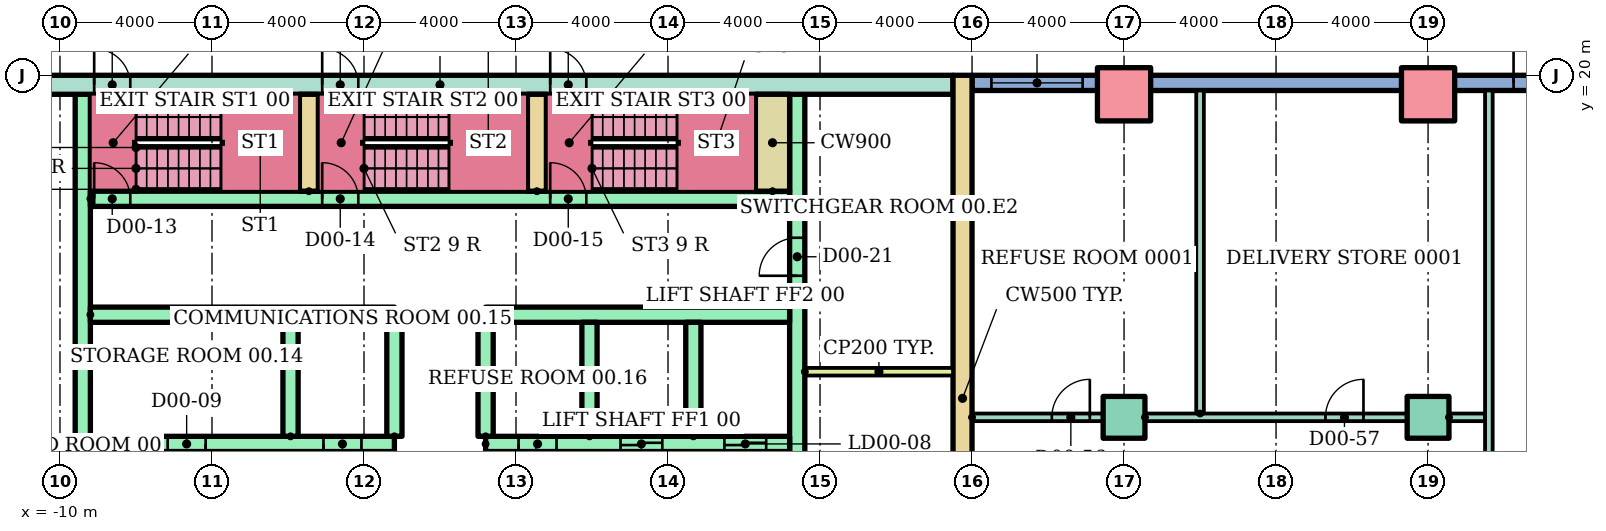
"""IFC4 building model, lengths in metres.
Left out: names, types, materials, properties, quantities, classifications, styles, units other than length and angle.
Written with IfcOpenShell. Run it as: python <this file> out.ifc"""

import sys

from ifc_helpers import new_model, si_unit, direction, frame, frame_2d, origin, origin_2d, place, context, subcontext, project, spatial, rectangle, hollow_rectangle, extrude, element, fill, save


model = new_model("IFC4")
c1 = context("Model", 3, precision=1e-05, world=origin(), true_north=direction((0.0, 1.0)))
c2 = subcontext(c1, "Body", "Model", "MODEL_VIEW")
j1 = project(units=[si_unit("LENGTHUNIT", "METRE"), si_unit("PLANEANGLEUNIT", "RADIAN")], contexts=[c1])
p1 = place(None, origin())
s1 = spatial("IfcSite", under=j1, at=p1, CompositionType="ELEMENT")
p2 = place(p1, origin())
s2 = spatial("IfcBuilding", under=s1, at=p2, CompositionType="ELEMENT")
p3 = place(p2, origin())
s3 = spatial("IfcBuildingStorey", under=s2, at=p3, CompositionType="ELEMENT", Elevation=0.0)
for number, where in (
    (1, (18.0, 11.0, 0.0)),
    (2, (26.0, 11.0, 0.0)),
):
    element("IfcColumn", number, at=place(p3, frame(where)), inside=s3, PredefinedType="COLUMN", context=c2, shape_type="SweptSolid", body=[
        extrude(rectangle(XDim=1.1, YDim=1.1, at=origin_2d()), origin(), (0.0, 0.0, 1.0), 6.0),
    ])
for number, where in (
    (3, (18.0, 19.5, 0.0)),
    (4, (26.0, 19.5, 0.0)),
):
    element("IfcColumn", number, at=place(p3, frame(where)), inside=s3, PredefinedType="COLUMN", context=c2, shape_type="SweptSolid", body=[
        extrude(hollow_rectangle(XDim=1.4, YDim=1.4, WallThickness=0.08, at=origin_2d()), origin(), (0.0, 0.0, 1.0), 6.0),
    ])
p4 = place(p3, frame((39.6, 19.8, 0.0), z_axis=(0.0, 0.0, 1.0), x_axis=(-1.0, 0.0, 0.0)))
e5 = element("IfcWall", 5, at=p4, inside=s3, PredefinedType="STANDARD", context=c2, shape_type="SweptSolid", body=[
    extrude(rectangle(XDim=25.6, YDim=0.4, at=frame_2d((12.8, 0.0))), origin(), (0.0, 0.0, 1.0), 5.7),
])
p5 = place(p4, frame((2.7, 0.0, 0.0)))
e6 = element("IfcOpeningElement", 6, at=p5, cuts=e5, PredefinedType="OPENING", context=c2, shape_type="SweptSolid", body=[
    extrude(rectangle(XDim=1.8, YDim=2.4, at=frame_2d((0.9, 1.2))), frame((0.0, 0.21, 0.0), z_axis=(0.0, -1.0, 0.0), x_axis=(1.0, 0.0, 0.0)), (0.0, 0.0, 1.0), 0.42),
])
p6 = place(p4, frame((22.69, 0.0, 0.9)))
e7 = element("IfcOpeningElement", 7, at=p6, cuts=e5, PredefinedType="OPENING", context=c2, shape_type="SweptSolid", body=[
    extrude(rectangle(XDim=2.4, YDim=2.4, at=frame_2d((1.2, 1.2))), frame((0.0, 0.21, 0.0), z_axis=(0.0, -1.0, 0.0), x_axis=(1.0, 0.0, 0.0)), (0.0, 0.0, 1.0), 0.42),
])
p7 = place(p4, frame((7.85, 0.0, 0.0)))
e8 = element("IfcOpeningElement", 8, at=p7, cuts=e5, PredefinedType="OPENING", context=c2, shape_type="SweptSolid", body=[
    extrude(rectangle(XDim=3.5, YDim=4.5, at=frame_2d((1.75, 2.25))), frame((0.0, 0.21, 0.0), z_axis=(0.0, -1.0, 0.0), x_axis=(1.0, 0.0, 0.0)), (0.0, 0.0, 1.0), 0.42),
])
p8 = place(p3, frame((13.75, 3.0, 0.0), z_axis=(0.0, 0.0, 1.0), x_axis=(0.0, 1.0, 0.0)))
e9 = element("IfcWall", 9, at=p8, inside=s3, PredefinedType="SHEAR", context=c2, shape_type="SweptSolid", body=[
    extrude(rectangle(XDim=17.0, YDim=0.5, at=frame_2d((8.5, 0.0))), origin(), (0.0, 0.0, 1.0), 5.7),
])
p9 = place(p3, frame((-13.5, 19.75, 0.0)))
e10 = element("IfcWall", 10, at=p9, inside=s3, PredefinedType="SHEAR", context=c2, shape_type="SweptSolid", body=[
    extrude(rectangle(XDim=27.0, YDim=0.5, at=frame_2d((13.5, 0.0))), origin(), (0.0, 0.0, 1.0), 5.7),
])
p10 = place(p9, frame((4.4, 0.0, 0.0)))
e11 = element("IfcOpeningElement", 11, at=p10, cuts=e10, PredefinedType="OPENING", context=c2, shape_type="SweptSolid", body=[
    extrude(rectangle(XDim=0.95, YDim=2.1, at=frame_2d((0.475, 1.05))), frame((0.0, 0.26, 0.0), z_axis=(0.0, -1.0, 0.0), x_axis=(1.0, 0.0, 0.0)), (0.0, 0.0, 1.0), 0.52),
])
p11 = place(p9, frame((10.4, 0.0, 0.0)))
e12 = element("IfcOpeningElement", 12, at=p11, cuts=e10, PredefinedType="OPENING", context=c2, shape_type="SweptSolid", body=[
    extrude(rectangle(XDim=0.95, YDim=2.1, at=frame_2d((0.475, 1.05))), frame((0.0, 0.26, 0.0), z_axis=(0.0, -1.0, 0.0), x_axis=(1.0, 0.0, 0.0)), (0.0, 0.0, 1.0), 0.52),
])
p12 = place(p9, frame((16.4, 0.0, 0.0)))
e13 = element("IfcOpeningElement", 13, at=p12, cuts=e10, PredefinedType="OPENING", context=c2, shape_type="SweptSolid", body=[
    extrude(rectangle(XDim=0.95, YDim=2.1, at=frame_2d((0.475, 1.05))), frame((0.0, 0.26, 0.0), z_axis=(0.0, -1.0, 0.0), x_axis=(1.0, 0.0, 0.0)), (0.0, 0.0, 1.0), 0.52),
])
p13 = place(p3, frame((-9.4, 6.8, 0.0), z_axis=(0.0, 0.0, 1.0), x_axis=(0.0, 1.0, 0.0)))
e14 = element("IfcWall", 14, at=p13, inside=s3, PredefinedType="SHEAR", context=c2, shape_type="SweptSolid", body=[
    extrude(rectangle(XDim=12.7, YDim=0.4, at=frame_2d((6.35, 0.0))), origin(), (0.0, 0.0, 1.0), 5.7),
])
p14 = place(p13, frame((1.1, 0.0, 0.0)))
e15 = element("IfcOpeningElement", 15, at=p14, cuts=e14, PredefinedType="OPENING", context=c2, shape_type="SweptSolid", body=[
    extrude(rectangle(XDim=1.1, YDim=2.1, at=frame_2d((0.55, 1.05))), frame((0.0, 0.21, 0.0), z_axis=(0.0, -1.0, 0.0), x_axis=(1.0, 0.0, 0.0)), (0.0, 0.0, 1.0), 0.42),
])
p15 = place(p3, frame((9.4, 6.8, 0.0), z_axis=(0.0, 0.0, 1.0), x_axis=(0.0, 1.0, 0.0)))
e16 = element("IfcWall", 16, at=p15, inside=s3, PredefinedType="SHEAR", context=c2, shape_type="SweptSolid", body=[
    extrude(rectangle(XDim=12.7, YDim=0.4, at=frame_2d((6.35, 0.0))), origin(), (0.0, 0.0, 1.0), 5.7),
])
p16 = place(p15, frame((1.15, 0.0, 0.0)))
e17 = element("IfcOpeningElement", 17, at=p16, cuts=e16, PredefinedType="OPENING", context=c2, shape_type="SweptSolid", body=[
    extrude(rectangle(XDim=1.0, YDim=2.1, at=frame_2d((0.5, 1.05))), frame((0.0, 0.21, 0.0), z_axis=(0.0, -1.0, 0.0), x_axis=(1.0, 0.0, 0.0)), (0.0, 0.0, 1.0), 0.42),
])
p17 = place(p15, frame((7.925, 0.0, 0.0)))
e18 = element("IfcOpeningElement", 18, at=p17, cuts=e16, PredefinedType="OPENING", context=c2, shape_type="SweptSolid", body=[
    extrude(rectangle(XDim=1.0, YDim=2.1, at=frame_2d((0.5, 1.05))), frame((0.0, 0.21, 0.0), z_axis=(0.0, -1.0, 0.0), x_axis=(1.0, 0.0, 0.0)), (0.0, 0.0, 1.0), 0.42),
])
p18 = place(p3, frame((-9.2, 10.3, 0.0)))
e19 = element("IfcWall", 19, at=p18, inside=s3, PredefinedType="SHEAR", context=c2, shape_type="SweptSolid", body=[
    extrude(rectangle(XDim=8.0, YDim=0.4, at=frame_2d((4.0, 0.0))), origin(), (0.0, 0.0, 1.0), 5.7),
])
p19 = place(p18, frame((2.033, 0.0, 0.0)))
e20 = element("IfcOpeningElement", 20, at=p19, cuts=e19, PredefinedType="OPENING", context=c2, shape_type="SweptSolid", body=[
    extrude(rectangle(XDim=1.0, YDim=2.1, at=frame_2d((0.5, 1.05))), frame((0.0, 0.21, 0.0), z_axis=(0.0, -1.0, 0.0), x_axis=(1.0, 0.0, 0.0)), (0.0, 0.0, 1.0), 0.42),
])
p20 = place(p18, frame((6.133, 0.0, 0.0)))
e21 = element("IfcOpeningElement", 21, at=p20, cuts=e19, PredefinedType="OPENING", context=c2, shape_type="SweptSolid", body=[
    extrude(rectangle(XDim=1.0, YDim=2.1, at=frame_2d((0.5, 1.05))), frame((0.0, 0.21, 0.0), z_axis=(0.0, -1.0, 0.0), x_axis=(1.0, 0.0, 0.0)), (0.0, 0.0, 1.0), 0.42),
])
p21 = place(p3, frame((-9.2, 13.7, 0.0)))
e22 = element("IfcWall", 22, at=p21, inside=s3, PredefinedType="SHEAR", context=c2, shape_type="SweptSolid", body=[
    extrude(rectangle(XDim=8.0, YDim=0.4, at=frame_2d((4.0, 0.0))), origin(), (0.0, 0.0, 1.0), 5.7),
])
p22 = place(p3, frame((1.2, 10.3, 0.0)))
e23 = element("IfcWall", 23, at=p22, inside=s3, PredefinedType="SHEAR", context=c2, shape_type="SweptSolid", body=[
    extrude(rectangle(XDim=8.0, YDim=0.4, at=frame_2d((4.0, 0.0))), origin(), (0.0, 0.0, 1.0), 5.7),
])
p23 = place(p22, frame((3.55, 0.0, 0.0)))
e24 = element("IfcOpeningElement", 24, at=p23, cuts=e23, PredefinedType="OPENING", context=c2, shape_type="SweptSolid", body=[
    extrude(rectangle(XDim=1.1, YDim=2.1, at=frame_2d((0.55, 1.05))), frame((0.0, 0.21, 0.0), z_axis=(0.0, -1.0, 0.0), x_axis=(1.0, 0.0, 0.0)), (0.0, 0.0, 1.0), 0.42),
])
p24 = place(p22, frame((6.283, 0.0, 0.0)))
e25 = element("IfcOpeningElement", 25, at=p24, cuts=e23, PredefinedType="OPENING", context=c2, shape_type="SweptSolid", body=[
    extrude(rectangle(XDim=1.1, YDim=2.1, at=frame_2d((0.55, 1.05))), frame((0.0, 0.21, 0.0), z_axis=(0.0, -1.0, 0.0), x_axis=(1.0, 0.0, 0.0)), (0.0, 0.0, 1.0), 0.42),
])
p25 = place(p22, frame((0.867, 0.0, 0.0)))
e26 = element("IfcOpeningElement", 26, at=p25, cuts=e23, PredefinedType="OPENING", context=c2, shape_type="SweptSolid", body=[
    extrude(rectangle(XDim=1.0, YDim=2.1, at=frame_2d((0.5, 1.05))), frame((0.0, 0.21, 0.0), z_axis=(0.0, -1.0, 0.0), x_axis=(1.0, 0.0, 0.0)), (0.0, 0.0, 1.0), 0.42),
])
p26 = place(p3, frame((1.2, 13.7, 0.0)))
e27 = element("IfcWall", 27, at=p26, inside=s3, PredefinedType="SHEAR", context=c2, shape_type="SweptSolid", body=[
    extrude(rectangle(XDim=8.0, YDim=0.4, at=frame_2d((4.0, 0.0))), origin(), (0.0, 0.0, 1.0), 5.7),
])
for number, where, z_axis, x_axis in (
    (28, (-3.933, 10.5, 0.0), (0.0, 0.0, 1.0), (0.0, 1.0, 0.0)),
    (29, (-1.2, 10.5, 0.0), (0.0, 0.0, 1.0), (0.0, 1.0, 0.0)),
    (30, (1.2, 10.5, 0.0), (0.0, 0.0, 1.0), (0.0, 1.0, 0.0)),
    (31, (3.933, 10.5, 0.0), (0.0, 0.0, 1.0), (0.0, 1.0, 0.0)),
    (32, (6.667, 10.5, 0.0), (0.0, 0.0, 1.0), (0.0, 1.0, 0.0)),
):
    element("IfcWall", number, at=place(p3, frame(where, z_axis=z_axis, x_axis=x_axis)), inside=s3, PredefinedType="SHEAR", context=c2, shape_type="SweptSolid", body=[
        extrude(rectangle(XDim=3.0, YDim=0.4, at=frame_2d((1.5, 0.0))), origin(), (0.0, 0.0, 1.0), 5.7),
    ])
p27 = place(p3, frame((-9.2, 16.75, 0.0)))
e33 = element("IfcWall", 33, at=p27, inside=s3, PredefinedType="SHEAR", context=c2, shape_type="SweptSolid", body=[
    extrude(rectangle(XDim=18.4, YDim=0.4, at=frame_2d((9.2, 0.0))), origin(), (0.0, 0.0, 1.0), 5.7),
])
p28 = place(p27, frame((0.1, 0.0, 0.0)))
e34 = element("IfcOpeningElement", 34, at=p28, cuts=e33, PredefinedType="OPENING", context=c2, shape_type="SweptSolid", body=[
    extrude(rectangle(XDim=0.95, YDim=2.1, at=frame_2d((0.475, 1.05))), frame((0.0, 0.21, 0.0), z_axis=(0.0, -1.0, 0.0), x_axis=(1.0, 0.0, 0.0)), (0.0, 0.0, 1.0), 0.42),
])
p29 = place(p27, frame((6.1, 0.0, 0.0)))
e35 = element("IfcOpeningElement", 35, at=p29, cuts=e33, PredefinedType="OPENING", context=c2, shape_type="SweptSolid", body=[
    extrude(rectangle(XDim=0.95, YDim=2.1, at=frame_2d((0.475, 1.05))), frame((0.0, 0.21, 0.0), z_axis=(0.0, -1.0, 0.0), x_axis=(1.0, 0.0, 0.0)), (0.0, 0.0, 1.0), 0.42),
])
p30 = place(p27, frame((12.1, 0.0, 0.0)))
e36 = element("IfcOpeningElement", 36, at=p30, cuts=e33, PredefinedType="OPENING", context=c2, shape_type="SweptSolid", body=[
    extrude(rectangle(XDim=0.95, YDim=2.1, at=frame_2d((0.475, 1.05))), frame((0.0, 0.21, 0.0), z_axis=(0.0, -1.0, 0.0), x_axis=(1.0, 0.0, 0.0)), (0.0, 0.0, 1.0), 0.42),
])
for number, where, z_axis, x_axis in (
    (37, (-3.45, 16.95, 0.0), (0.0, 0.0, 1.0), (0.0, 1.0, 0.0)),
    (38, (2.55, 16.95, 0.0), (0.0, 0.0, 1.0), (0.0, 1.0, 0.0)),
):
    element("IfcWall", number, at=place(p3, frame(where, z_axis=z_axis, x_axis=x_axis)), inside=s3, PredefinedType="SHEAR", context=c2, shape_type="SweptSolid", body=[
        extrude(rectangle(XDim=2.55, YDim=0.5, at=frame_2d((1.275, 0.0))), origin(), (0.0, 0.0, 1.0), 5.7),
    ])
p31 = place(p3, frame((8.75, 16.95, 0.0), z_axis=(0.0, 0.0, 1.0), x_axis=(0.0, 1.0, 0.0)))
e39 = element("IfcWall", 39, at=p31, inside=s3, PredefinedType="SHEAR", context=c2, shape_type="SweptSolid", body=[
    extrude(rectangle(XDim=2.55, YDim=0.9, at=frame_2d((1.275, 0.0))), origin(), (0.0, 0.0, 1.0), 5.7),
])
p32 = place(p3, frame((9.6, 12.2, 0.0)))
e40 = element("IfcWall", 40, at=p32, inside=s3, PredefinedType="PARTITIONING", context=c2, shape_type="SweptSolid", body=[
    extrude(rectangle(XDim=3.9, YDim=0.2, at=frame_2d((1.95, 0.0))), origin(), (0.0, 0.0, 1.0), 5.7),
])
p33 = place(p3, frame((14.0, 11.0, 0.0)))
e41 = element("IfcWall", 41, at=p33, inside=s3, PredefinedType="PARTITIONING", context=c2, shape_type="SweptSolid", body=[
    extrude(rectangle(XDim=3.45, YDim=0.2, at=frame_2d((1.725, 0.0))), origin(), (0.0, 0.0, 1.0), 5.7),
])
p34 = place(p33, frame((2.1, 0.0, 0.0)))
e42 = element("IfcOpeningElement", 42, at=p34, cuts=e41, PredefinedType="OPENING", context=c2, shape_type="SweptSolid", body=[
    extrude(rectangle(XDim=1.0, YDim=2.1, at=frame_2d((0.5, 1.05))), frame((0.0, 0.11, 0.0), z_axis=(0.0, -1.0, 0.0), x_axis=(1.0, 0.0, 0.0)), (0.0, 0.0, 1.0), 0.22),
])
p35 = place(p3, frame((18.55, 11.0, 0.0)))
e43 = element("IfcWall", 43, at=p35, inside=s3, PredefinedType="PARTITIONING", context=c2, shape_type="SweptSolid", body=[
    extrude(rectangle(XDim=6.9, YDim=0.2, at=frame_2d((3.45, 0.0))), origin(), (0.0, 0.0, 1.0), 5.7),
])
p36 = place(p35, frame((4.75, 0.0, 0.0)))
e44 = element("IfcOpeningElement", 44, at=p36, cuts=e43, PredefinedType="OPENING", context=c2, shape_type="SweptSolid", body=[
    extrude(rectangle(XDim=1.0, YDim=2.1, at=frame_2d((0.5, 1.05))), frame((0.0, 0.11, 0.0), z_axis=(0.0, -1.0, 0.0), x_axis=(1.0, 0.0, 0.0)), (0.0, 0.0, 1.0), 0.22),
])
p37 = place(p3, frame((26.55, 11.0, 0.0)))
e45 = element("IfcWall", 45, at=p37, inside=s3, PredefinedType="PARTITIONING", context=c2, shape_type="SweptSolid", body=[
    extrude(rectangle(XDim=0.95, YDim=0.2, at=frame_2d((0.475, 0.0))), origin(), (0.0, 0.0, 1.0), 5.7),
])
p38 = place(p3, frame((20.0, 11.1, 0.0), z_axis=(0.0, 0.0, 1.0), x_axis=(0.0, 1.0, 0.0)))
e46 = element("IfcWall", 46, at=p38, inside=s3, PredefinedType="PARTITIONING", context=c2, shape_type="SweptSolid", body=[
    extrude(rectangle(XDim=8.5, YDim=0.2, at=frame_2d((4.25, 0.0))), origin(), (0.0, 0.0, 1.0), 5.7),
])
p39 = place(p3, frame((27.6, 8.1, 0.0), z_axis=(0.0, 0.0, 1.0), x_axis=(0.0, 1.0, 0.0)))
e47 = element("IfcWall", 47, at=p39, inside=s3, PredefinedType="PARTITIONING", context=c2, shape_type="SweptSolid", body=[
    extrude(rectangle(XDim=11.5, YDim=0.2, at=frame_2d((5.75, 0.0))), origin(), (0.0, 0.0, 1.0), 5.7),
])
p40 = place(p39, frame((0.9, 0.0, 0.0)))
e48 = element("IfcOpeningElement", 48, at=p40, cuts=e47, PredefinedType="OPENING", context=c2, shape_type="SweptSolid", body=[
    extrude(rectangle(XDim=1.0, YDim=2.1, at=frame_2d((0.5, 1.05))), frame((0.0, 0.11, 0.0), z_axis=(0.0, -1.0, 0.0), x_axis=(1.0, 0.0, 0.0)), (0.0, 0.0, 1.0), 0.22),
])
p41 = place(p6, origin())
e49 = element("IfcWindow", 49, at=p41, inside=s3, PartitioningType="SINGLE_PANEL", PredefinedType="WINDOW", context=c2, shape_type="SweptSolid", body=[
    extrude(rectangle(XDim=2.4, YDim=2.4, at=frame_2d((1.2, 1.2))), frame((0.0, 0.03, 0.0), z_axis=(0.0, -1.0, 0.0), x_axis=(1.0, 0.0, 0.0)), (0.0, 0.0, 1.0), 0.06),
])
fill(e7, e49)
p42 = place(p23, origin())
e50 = element("IfcDoor", 50, at=p42, inside=s3, OperationType="SLIDING_TO_LEFT", PredefinedType="DOOR", context=c2, shape_type="SweptSolid", body=[
    extrude(rectangle(XDim=1.1, YDim=2.1, at=frame_2d((0.55, 1.05))), frame((0.0, 0.025, 0.0), z_axis=(0.0, -1.0, 0.0), x_axis=(1.0, 0.0, 0.0)), (0.0, 0.0, 1.0), 0.05),
])
fill(e24, e50)
p43 = place(p24, origin())
e51 = element("IfcDoor", 51, at=p43, inside=s3, OperationType="SLIDING_TO_LEFT", PredefinedType="DOOR", context=c2, shape_type="SweptSolid", body=[
    extrude(rectangle(XDim=1.1, YDim=2.1, at=frame_2d((0.55, 1.05))), frame((0.0, 0.025, 0.0), z_axis=(0.0, -1.0, 0.0), x_axis=(1.0, 0.0, 0.0)), (0.0, 0.0, 1.0), 0.05),
])
fill(e25, e51)
p44 = place(p19, frame((1.0, 0.0, 0.0), z_axis=(0.0, 0.0, 1.0), x_axis=(-1.0, 0.0, 0.0)))
e52 = element("IfcDoor", 52, at=p44, inside=s3, OperationType="SINGLE_SWING_RIGHT", PredefinedType="DOOR", context=c2, shape_type="SweptSolid", body=[
    extrude(rectangle(XDim=1.0, YDim=2.1, at=frame_2d((0.5, 1.05))), frame((0.0, 0.025, 0.0), z_axis=(0.0, -1.0, 0.0), x_axis=(1.0, 0.0, 0.0)), (0.0, 0.0, 1.0), 0.05),
])
fill(e20, e52)
p45 = place(p20, frame((1.0, 0.0, 0.0), z_axis=(0.0, 0.0, 1.0), x_axis=(-1.0, 0.0, 0.0)))
e53 = element("IfcDoor", 53, at=p45, inside=s3, OperationType="SINGLE_SWING_LEFT", PredefinedType="DOOR", context=c2, shape_type="SweptSolid", body=[
    extrude(rectangle(XDim=1.0, YDim=2.1, at=frame_2d((0.5, 1.05))), frame((0.0, 0.025, 0.0), z_axis=(0.0, -1.0, 0.0), x_axis=(1.0, 0.0, 0.0)), (0.0, 0.0, 1.0), 0.05),
])
fill(e21, e53)
p46 = place(p25, frame((1.0, 0.0, 0.0), z_axis=(0.0, 0.0, 1.0), x_axis=(-1.0, 0.0, 0.0)))
e54 = element("IfcDoor", 54, at=p46, inside=s3, OperationType="SINGLE_SWING_LEFT", PredefinedType="DOOR", context=c2, shape_type="SweptSolid", body=[
    extrude(rectangle(XDim=1.0, YDim=2.1, at=frame_2d((0.5, 1.05))), frame((0.0, 0.025, 0.0), z_axis=(0.0, -1.0, 0.0), x_axis=(1.0, 0.0, 0.0)), (0.0, 0.0, 1.0), 0.05),
])
fill(e26, e54)
p47 = place(p28, origin())
e55 = element("IfcDoor", 55, at=p47, inside=s3, OperationType="SINGLE_SWING_LEFT", PredefinedType="DOOR", context=c2, shape_type="SweptSolid", body=[
    extrude(rectangle(XDim=0.95, YDim=2.1, at=frame_2d((0.475, 1.05))), frame((0.0, 0.025, 0.0), z_axis=(0.0, -1.0, 0.0), x_axis=(1.0, 0.0, 0.0)), (0.0, 0.0, 1.0), 0.05),
])
fill(e34, e55)
p48 = place(p29, origin())
e56 = element("IfcDoor", 56, at=p48, inside=s3, OperationType="SINGLE_SWING_LEFT", PredefinedType="DOOR", context=c2, shape_type="SweptSolid", body=[
    extrude(rectangle(XDim=0.95, YDim=2.1, at=frame_2d((0.475, 1.05))), frame((0.0, 0.025, 0.0), z_axis=(0.0, -1.0, 0.0), x_axis=(1.0, 0.0, 0.0)), (0.0, 0.0, 1.0), 0.05),
])
fill(e35, e56)
p49 = place(p30, origin())
e57 = element("IfcDoor", 57, at=p49, inside=s3, OperationType="SINGLE_SWING_LEFT", PredefinedType="DOOR", context=c2, shape_type="SweptSolid", body=[
    extrude(rectangle(XDim=0.95, YDim=2.1, at=frame_2d((0.475, 1.05))), frame((0.0, 0.025, 0.0), z_axis=(0.0, -1.0, 0.0), x_axis=(1.0, 0.0, 0.0)), (0.0, 0.0, 1.0), 0.05),
])
fill(e36, e57)
p50 = place(p10, origin())
e58 = element("IfcDoor", 58, at=p50, inside=s3, OperationType="SINGLE_SWING_LEFT", PredefinedType="DOOR", context=c2, shape_type="SweptSolid", body=[
    extrude(rectangle(XDim=0.95, YDim=2.1, at=frame_2d((0.475, 1.05))), frame((0.0, 0.025, 0.0), z_axis=(0.0, -1.0, 0.0), x_axis=(1.0, 0.0, 0.0)), (0.0, 0.0, 1.0), 0.05),
])
fill(e11, e58)
p51 = place(p11, origin())
e59 = element("IfcDoor", 59, at=p51, inside=s3, OperationType="SINGLE_SWING_LEFT", PredefinedType="DOOR", context=c2, shape_type="SweptSolid", body=[
    extrude(rectangle(XDim=0.95, YDim=2.1, at=frame_2d((0.475, 1.05))), frame((0.0, 0.025, 0.0), z_axis=(0.0, -1.0, 0.0), x_axis=(1.0, 0.0, 0.0)), (0.0, 0.0, 1.0), 0.05),
])
fill(e12, e59)
p52 = place(p12, origin())
e60 = element("IfcDoor", 60, at=p52, inside=s3, OperationType="SINGLE_SWING_LEFT", PredefinedType="DOOR", context=c2, shape_type="SweptSolid", body=[
    extrude(rectangle(XDim=0.95, YDim=2.1, at=frame_2d((0.475, 1.05))), frame((0.0, 0.025, 0.0), z_axis=(0.0, -1.0, 0.0), x_axis=(1.0, 0.0, 0.0)), (0.0, 0.0, 1.0), 0.05),
])
fill(e13, e60)
p53 = place(p17, origin())
e61 = element("IfcDoor", 61, at=p53, inside=s3, OperationType="SINGLE_SWING_LEFT", PredefinedType="DOOR", context=c2, shape_type="SweptSolid", body=[
    extrude(rectangle(XDim=1.0, YDim=2.1, at=frame_2d((0.5, 1.05))), frame((0.0, 0.025, 0.0), z_axis=(0.0, -1.0, 0.0), x_axis=(1.0, 0.0, 0.0)), (0.0, 0.0, 1.0), 0.05),
])
fill(e18, e61)
p54 = place(p34, origin())
e62 = element("IfcDoor", 62, at=p54, inside=s3, OperationType="SINGLE_SWING_RIGHT", PredefinedType="DOOR", context=c2, shape_type="SweptSolid", body=[
    extrude(rectangle(XDim=1.0, YDim=2.1, at=frame_2d((0.5, 1.05))), frame((0.0, 0.025, 0.0), z_axis=(0.0, -1.0, 0.0), x_axis=(1.0, 0.0, 0.0)), (0.0, 0.0, 1.0), 0.05),
])
fill(e42, e62)
p55 = place(p36, origin())
e63 = element("IfcDoor", 63, at=p55, inside=s3, OperationType="SINGLE_SWING_RIGHT", PredefinedType="DOOR", context=c2, shape_type="SweptSolid", body=[
    extrude(rectangle(XDim=1.0, YDim=2.1, at=frame_2d((0.5, 1.05))), frame((0.0, 0.025, 0.0), z_axis=(0.0, -1.0, 0.0), x_axis=(1.0, 0.0, 0.0)), (0.0, 0.0, 1.0), 0.05),
])
fill(e44, e63)
p56 = place(p7, frame((3.5, 0.0, 0.0), z_axis=(0.0, 0.0, 1.0), x_axis=(-1.0, 0.0, 0.0)))
e64 = element("IfcDoor", 64, at=p56, inside=s3, OperationType="DOUBLE_DOOR_SINGLE_SWING", PredefinedType="DOOR", context=c2, shape_type="SweptSolid", body=[
    extrude(rectangle(XDim=3.5, YDim=4.5, at=frame_2d((1.75, 2.25))), frame((0.0, 0.025, 0.0), z_axis=(0.0, -1.0, 0.0), x_axis=(1.0, 0.0, 0.0)), (0.0, 0.0, 1.0), 0.05),
])
fill(e8, e64)
save(model, sys.argv[1])
